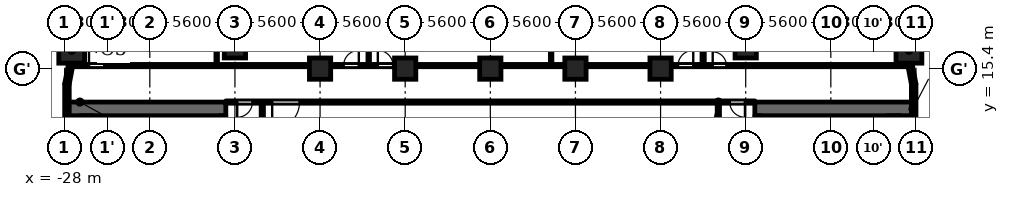
"""IFC4 building model, lengths in metres.
Left out: names, types, materials, properties, quantities, classifications, styles, units other than length and angle.
Written with IfcOpenShell. Run it as: python <this file> out.ifc"""

import sys

from ifc_helpers import new_model, si_unit, direction, frame, frame_2d, origin, origin_2d, place, context, subcontext, project, spatial, rectangle, extrude, element, fill, save


model = new_model("IFC4")
c1 = context("Model", 3, precision=1e-05, world=origin(), true_north=direction((0.0, 1.0)))
c2 = subcontext(c1, "Body", "Model", "MODEL_VIEW")
j1 = project(units=[si_unit("LENGTHUNIT", "METRE"), si_unit("PLANEANGLEUNIT", "RADIAN")], contexts=[c1])
p1 = place(None, origin())
s1 = spatial("IfcSite", under=j1, at=p1, CompositionType="ELEMENT")
p2 = place(p1, origin())
s2 = spatial("IfcBuilding", under=s1, at=p2, CompositionType="ELEMENT")
p3 = place(p2, frame((0.0, 0.0, 20.9)))
s3 = spatial("IfcBuildingStorey", under=s2, at=p3, CompositionType="ELEMENT", Elevation=20.9)
for number, where, z_axis, x_axis in (
    (1, (27.538, 16.609, 0.0), (0.0, 0.0, 1.0), (1.0, 0.0, 0.0)),
    (2, (-27.538, 16.609, 0.0), (0.0, 0.0, 1.0), (1.0, 0.0, 0.0)),
):
    element("IfcColumn", number, at=place(p3, frame(where, z_axis=z_axis, x_axis=x_axis)), inside=s3, PredefinedType="COLUMN", context=c2, shape_type="SweptSolid", body=[
        extrude(rectangle(XDim=1.7, YDim=1.7, at=origin_2d()), origin(), (0.0, 0.0, 1.0), 4.8),
    ])
for number, where, z_axis, x_axis in (
    (3, (-16.8, 16.8, 0.0), (0.0, 0.0, 1.0), (1.0, 0.0, 0.0)),
    (4, (16.8, 16.8, 0.0), (0.0, 0.0, 1.0), (1.0, 0.0, 0.0)),
    (5, (-11.2, 15.4, 0.0), (0.0, 0.0, 1.0), (1.0, 0.0, 0.0)),
    (6, (-5.6, 15.4, 0.0), (0.0, 0.0, 1.0), (1.0, 0.0, 0.0)),
    (7, (0.0, 15.4, 0.0), (0.0, 0.0, 1.0), (1.0, 0.0, 0.0)),
    (8, (5.6, 15.4, 0.0), (0.0, 0.0, 1.0), (1.0, 0.0, 0.0)),
    (9, (11.2, 15.4, 0.0), (0.0, 0.0, 1.0), (1.0, 0.0, 0.0)),
):
    element("IfcColumn", number, at=place(p3, frame(where, z_axis=z_axis, x_axis=x_axis)), inside=s3, PredefinedType="COLUMN", context=c2, shape_type="SweptSolid", body=[
        extrude(rectangle(XDim=1.4, YDim=1.4, at=origin_2d()), origin(), (0.0, 0.0, 1.0), 4.8),
    ])
p4 = place(p3, frame((27.85, 12.05, 0.0), z_axis=(0.0, 0.0, 1.0), x_axis=(0.0, 1.0, 0.0)))
e10 = element("IfcWall", 10, at=p4, inside=s3, PredefinedType="SOLIDWALL", context=c2, shape_type="SweptSolid", body=[
    extrude(rectangle(XDim=2.35, YDim=0.3, at=frame_2d((1.175, 0.0))), origin(), (0.0, 0.0, 1.0), 3.55),
])
for number, where, z_axis, x_axis in (
    (11, (27.853, 14.372, 0.0), (0.0, 0.0, 1.0), (-0.187, 0.982, 0.0)),
    (12, (-27.589, 15.753, 0.0), (0.0, 0.0, 1.0), (-0.187, -0.982, 0.0)),
):
    element("IfcWall", number, at=place(p3, frame(where, z_axis=z_axis, x_axis=x_axis)), inside=s3, PredefinedType="SOLIDWALL", context=c2, shape_type="SweptSolid", body=[
        extrude(rectangle(XDim=1.406, YDim=0.3, at=frame_2d((0.703, 0.0))), origin(), (0.0, 0.0, 1.0), 3.55),
    ])
p5 = place(p3, frame((-27.85, 14.4, 0.0), z_axis=(0.0, 0.0, 1.0), x_axis=(0.0, -1.0, 0.0)))
e13 = element("IfcWall", 13, at=p5, inside=s3, PredefinedType="SOLIDWALL", context=c2, shape_type="SweptSolid", body=[
    extrude(rectangle(XDim=2.35, YDim=0.3, at=frame_2d((1.175, 0.0))), origin(), (0.0, 0.0, 1.0), 3.55),
])
p6 = place(p3, frame((-17.4, 12.75, 0.0), z_axis=(0.0, 0.0, 1.0), x_axis=(-1.0, 0.0, 0.0)))
e14 = element("IfcWall", 14, at=p6, inside=s3, PredefinedType="SHEAR", context=c2, shape_type="SweptSolid", body=[
    extrude(rectangle(XDim=10.4, YDim=0.9, at=frame_2d((5.2, 0.0))), origin(), (0.0, 0.0, 1.0), 4.45),
])
p7 = place(p3, frame((-17.6, -12.3, 0.0), z_axis=(0.0, 0.0, 1.0), x_axis=(0.0, 1.0, 0.0)))
e15 = element("IfcWall", 15, at=p7, inside=s3, PredefinedType="SHEAR", context=c2, shape_type="SweptSolid", body=[
    extrude(rectangle(XDim=24.6, YDim=0.4, at=frame_2d((12.3, 0.0))), origin(), (0.0, 0.0, 1.0), 4.45),
])
p8 = place(p7, frame((6.0, 0.0, 0.0)))
e16 = element("IfcOpeningElement", 16, at=p8, cuts=e15, PredefinedType="OPENING", context=c2, shape_type="SweptSolid", body=[
    extrude(rectangle(XDim=1.1, YDim=2.1, at=frame_2d((0.55, 1.05))), frame((0.0, 0.21, 0.0), z_axis=(0.0, -1.0, 0.0), x_axis=(1.0, 0.0, 0.0)), (0.0, 0.0, 1.0), 0.42),
])
p9 = place(p7, frame((8.4, 0.0, 0.0)))
e17 = element("IfcOpeningElement", 17, at=p9, cuts=e15, PredefinedType="OPENING", context=c2, shape_type="SweptSolid", body=[
    extrude(rectangle(XDim=1.1, YDim=2.1, at=frame_2d((0.55, 1.05))), frame((0.0, 0.21, 0.0), z_axis=(0.0, -1.0, 0.0), x_axis=(1.0, 0.0, 0.0)), (0.0, 0.0, 1.0), 0.42),
])
p10 = place(p7, frame((10.8, 0.0, 0.0)))
e18 = element("IfcOpeningElement", 18, at=p10, cuts=e15, PredefinedType="OPENING", context=c2, shape_type="SweptSolid", body=[
    extrude(rectangle(XDim=1.1, YDim=2.1, at=frame_2d((0.55, 1.05))), frame((0.0, 0.21, 0.0), z_axis=(0.0, -1.0, 0.0), x_axis=(1.0, 0.0, 0.0)), (0.0, 0.0, 1.0), 0.42),
])
p11 = place(p7, frame((16.75, 0.0, 0.0)))
e19 = element("IfcOpeningElement", 19, at=p11, cuts=e15, PredefinedType="OPENING", context=c2, shape_type="SweptSolid", body=[
    extrude(rectangle(XDim=0.9, YDim=2.1, at=frame_2d((0.45, 1.05))), frame((0.0, 0.21, 0.0), z_axis=(0.0, -1.0, 0.0), x_axis=(1.0, 0.0, 0.0)), (0.0, 0.0, 1.0), 0.42),
])
p12 = place(p7, frame((22.8, 0.0, 0.0)))
e20 = element("IfcOpeningElement", 20, at=p12, cuts=e15, PredefinedType="OPENING", context=c2, shape_type="SweptSolid", body=[
    extrude(rectangle(XDim=1.1, YDim=2.1, at=frame_2d((0.55, 1.05))), frame((0.0, 0.21, 0.0), z_axis=(0.0, -1.0, 0.0), x_axis=(1.0, 0.0, 0.0)), (0.0, 0.0, 1.0), 0.42),
])
p13 = place(p7, frame((0.7, 0.0, 0.0)))
e21 = element("IfcOpeningElement", 21, at=p13, cuts=e15, PredefinedType="OPENING", context=c2, shape_type="SweptSolid", body=[
    extrude(rectangle(XDim=1.1, YDim=2.1, at=frame_2d((0.55, 1.05))), frame((0.0, 0.21, 0.0), z_axis=(0.0, -1.0, 0.0), x_axis=(1.0, 0.0, 0.0)), (0.0, 0.0, 1.0), 0.42),
])
p14 = place(p7, frame((12.775, 0.0, 0.0)))
e22 = element("IfcOpeningElement", 22, at=p14, cuts=e15, PredefinedType="OPENING", context=c2, shape_type="SweptSolid", body=[
    extrude(rectangle(XDim=1.8, YDim=2.1, at=frame_2d((0.9, 1.05))), frame((0.0, 0.21, 0.0), z_axis=(0.0, -1.0, 0.0), x_axis=(1.0, 0.0, 0.0)), (0.0, 0.0, 1.0), 0.42),
])
p15 = place(p3, frame((-26.55, -12.3, 0.0), z_axis=(0.0, 0.0, 1.0), x_axis=(0.0, 1.0, 0.0)))
e23 = element("IfcWall", 23, at=p15, inside=s3, PredefinedType="SHEAR", context=c2, shape_type="SweptSolid", body=[
    extrude(rectangle(XDim=24.6, YDim=0.9, at=frame_2d((12.3, 0.0))), origin(), (0.0, 0.0, 1.0), 4.45),
])
p16 = place(p3, frame((-23.55, 9.8, 0.0), z_axis=(0.0, 0.0, 1.0), x_axis=(0.0, 1.0, 0.0)))
e24 = element("IfcWall", 24, at=p16, inside=s3, PredefinedType="PARTITIONING", context=c2, shape_type="SweptSolid", body=[
    extrude(rectangle(XDim=2.5, YDim=0.2, at=frame_2d((1.25, 0.0))), origin(), (0.0, 0.0, 1.0), 4.45),
])
p17 = place(p16, frame((0.8, 0.0, 0.0)))
e25 = element("IfcOpeningElement", 25, at=p17, cuts=e24, PredefinedType="OPENING", context=c2, shape_type="SweptSolid", body=[
    extrude(rectangle(XDim=0.9, YDim=2.1, at=frame_2d((0.45, 1.05))), frame((0.0, 0.11, 0.0), z_axis=(0.0, -1.0, 0.0), x_axis=(1.0, 0.0, 0.0)), (0.0, 0.0, 1.0), 0.22),
])
p18 = place(p3, frame((17.4, 12.75, 0.0), z_axis=(0.0, 0.0, 1.0), x_axis=(1.0, 0.0, 0.0)))
e26 = element("IfcWall", 26, at=p18, inside=s3, PredefinedType="SHEAR", context=c2, shape_type="SweptSolid", body=[
    extrude(rectangle(XDim=10.4, YDim=0.9, at=frame_2d((5.2, 0.0))), origin(), (0.0, 0.0, 1.0), 4.45),
])
p19 = place(p3, frame((17.6, -12.3, 0.0), z_axis=(0.0, 0.0, 1.0), x_axis=(0.0, 1.0, 0.0)))
e27 = element("IfcWall", 27, at=p19, inside=s3, PredefinedType="SHEAR", context=c2, shape_type="SweptSolid", body=[
    extrude(rectangle(XDim=24.6, YDim=0.4, at=frame_2d((12.3, 0.0))), origin(), (0.0, 0.0, 1.0), 4.45),
])
p20 = place(p19, frame((6.0, 0.0, 0.0)))
e28 = element("IfcOpeningElement", 28, at=p20, cuts=e27, PredefinedType="OPENING", context=c2, shape_type="SweptSolid", body=[
    extrude(rectangle(XDim=1.1, YDim=2.1, at=frame_2d((0.55, 1.05))), frame((0.0, 0.21, 0.0), z_axis=(0.0, -1.0, 0.0), x_axis=(1.0, 0.0, 0.0)), (0.0, 0.0, 1.0), 0.42),
])
p21 = place(p19, frame((8.4, 0.0, 0.0)))
e29 = element("IfcOpeningElement", 29, at=p21, cuts=e27, PredefinedType="OPENING", context=c2, shape_type="SweptSolid", body=[
    extrude(rectangle(XDim=1.1, YDim=2.1, at=frame_2d((0.55, 1.05))), frame((0.0, 0.21, 0.0), z_axis=(0.0, -1.0, 0.0), x_axis=(1.0, 0.0, 0.0)), (0.0, 0.0, 1.0), 0.42),
])
p22 = place(p19, frame((10.8, 0.0, 0.0)))
e30 = element("IfcOpeningElement", 30, at=p22, cuts=e27, PredefinedType="OPENING", context=c2, shape_type="SweptSolid", body=[
    extrude(rectangle(XDim=1.1, YDim=2.1, at=frame_2d((0.55, 1.05))), frame((0.0, 0.21, 0.0), z_axis=(0.0, -1.0, 0.0), x_axis=(1.0, 0.0, 0.0)), (0.0, 0.0, 1.0), 0.42),
])
p23 = place(p19, frame((16.75, 0.0, 0.0)))
e31 = element("IfcOpeningElement", 31, at=p23, cuts=e27, PredefinedType="OPENING", context=c2, shape_type="SweptSolid", body=[
    extrude(rectangle(XDim=0.9, YDim=2.1, at=frame_2d((0.45, 1.05))), frame((0.0, 0.21, 0.0), z_axis=(0.0, -1.0, 0.0), x_axis=(1.0, 0.0, 0.0)), (0.0, 0.0, 1.0), 0.42),
])
p24 = place(p19, frame((22.8, 0.0, 0.0)))
e32 = element("IfcOpeningElement", 32, at=p24, cuts=e27, PredefinedType="OPENING", context=c2, shape_type="SweptSolid", body=[
    extrude(rectangle(XDim=1.1, YDim=2.1, at=frame_2d((0.55, 1.05))), frame((0.0, 0.21, 0.0), z_axis=(0.0, -1.0, 0.0), x_axis=(1.0, 0.0, 0.0)), (0.0, 0.0, 1.0), 0.42),
])
p25 = place(p19, frame((0.7, 0.0, 0.0)))
e33 = element("IfcOpeningElement", 33, at=p25, cuts=e27, PredefinedType="OPENING", context=c2, shape_type="SweptSolid", body=[
    extrude(rectangle(XDim=1.1, YDim=2.1, at=frame_2d((0.55, 1.05))), frame((0.0, 0.21, 0.0), z_axis=(0.0, -1.0, 0.0), x_axis=(1.0, 0.0, 0.0)), (0.0, 0.0, 1.0), 0.42),
])
p26 = place(p19, frame((12.775, 0.0, 0.0)))
e34 = element("IfcOpeningElement", 34, at=p26, cuts=e27, PredefinedType="OPENING", context=c2, shape_type="SweptSolid", body=[
    extrude(rectangle(XDim=1.8, YDim=2.1, at=frame_2d((0.9, 1.05))), frame((0.0, 0.21, 0.0), z_axis=(0.0, -1.0, 0.0), x_axis=(1.0, 0.0, 0.0)), (0.0, 0.0, 1.0), 0.42),
])
p27 = place(p3, frame((26.55, -12.3, 0.0), z_axis=(0.0, 0.0, 1.0), x_axis=(0.0, 1.0, 0.0)))
e35 = element("IfcWall", 35, at=p27, inside=s3, PredefinedType="SHEAR", context=c2, shape_type="SweptSolid", body=[
    extrude(rectangle(XDim=24.6, YDim=0.9, at=frame_2d((12.3, 0.0))), origin(), (0.0, 0.0, 1.0), 4.45),
])
p28 = place(p3, frame((23.55, 9.8, 0.0), z_axis=(0.0, 0.0, 1.0), x_axis=(0.0, 1.0, 0.0)))
e36 = element("IfcWall", 36, at=p28, inside=s3, PredefinedType="PARTITIONING", context=c2, shape_type="SweptSolid", body=[
    extrude(rectangle(XDim=2.5, YDim=0.2, at=frame_2d((1.25, 0.0))), origin(), (0.0, 0.0, 1.0), 4.45),
])
p29 = place(p28, frame((0.8, 0.0, 0.0)))
e37 = element("IfcOpeningElement", 37, at=p29, cuts=e36, PredefinedType="OPENING", context=c2, shape_type="SweptSolid", body=[
    extrude(rectangle(XDim=0.9, YDim=2.1, at=frame_2d((0.45, 1.05))), frame((0.0, 0.11, 0.0), z_axis=(0.0, -1.0, 0.0), x_axis=(1.0, 0.0, 0.0)), (0.0, 0.0, 1.0), 0.22),
])
p30 = place(p3, frame((-17.4, 13.2, 0.0), z_axis=(0.0, 0.0, 1.0), x_axis=(1.0, 0.0, 0.0)))
e38 = element("IfcWall", 38, at=p30, inside=s3, PredefinedType="PARTITIONING", context=c2, shape_type="SweptSolid", body=[
    extrude(rectangle(XDim=34.8, YDim=0.15, at=frame_2d((17.4, 0.0))), origin(), (0.0, 0.0, 1.0), 4.45),
])
p31 = place(p30, frame((3.05, 0.0, 0.0)))
e39 = element("IfcOpeningElement", 39, at=p31, cuts=e38, PredefinedType="OPENING", context=c2, shape_type="SweptSolid", body=[
    extrude(rectangle(XDim=1.8, YDim=2.1, at=frame_2d((0.9, 1.05))), frame((0.0, 0.085, 0.0), z_axis=(0.0, -1.0, 0.0), x_axis=(1.0, 0.0, 0.0)), (0.0, 0.0, 1.0), 0.17),
])
p32 = place(p30, frame((0.75, 0.0, 0.0)))
e40 = element("IfcOpeningElement", 40, at=p32, cuts=e38, PredefinedType="OPENING", context=c2, shape_type="SweptSolid", body=[
    extrude(rectangle(XDim=1.0, YDim=2.1, at=frame_2d((0.5, 1.05))), frame((0.0, 0.085, 0.0), z_axis=(0.0, -1.0, 0.0), x_axis=(1.0, 0.0, 0.0)), (0.0, 0.0, 1.0), 0.17),
])
p33 = place(p30, frame((33.15, 0.0, 0.0)))
e41 = element("IfcOpeningElement", 41, at=p33, cuts=e38, PredefinedType="OPENING", context=c2, shape_type="SweptSolid", body=[
    extrude(rectangle(XDim=1.0, YDim=2.1, at=frame_2d((0.5, 1.05))), frame((0.0, 0.085, 0.0), z_axis=(0.0, -1.0, 0.0), x_axis=(1.0, 0.0, 0.0)), (0.0, 0.0, 1.0), 0.17),
])
p34 = place(p3, frame((-27.446, 15.6, 0.0), z_axis=(0.0, 0.0, 1.0), x_axis=(1.0, 0.0, 0.0)))
e42 = element("IfcWall", 42, at=p34, inside=s3, PredefinedType="PARTITIONING", context=c2, shape_type="SweptSolid", body=[
    extrude(rectangle(XDim=54.892, YDim=0.15, at=frame_2d((27.446, 0.0))), origin(), (0.0, 0.0, 1.0), 4.45),
])
p35 = place(p34, frame((1.046, 0.0, 0.0)))
e43 = element("IfcOpeningElement", 43, at=p35, cuts=e42, PredefinedType="OPENING", context=c2, shape_type="SweptSolid", body=[
    extrude(rectangle(XDim=1.0, YDim=2.1, at=frame_2d((0.5, 1.05))), frame((0.0, 0.085, 0.0), z_axis=(0.0, -1.0, 0.0), x_axis=(1.0, 0.0, 0.0)), (0.0, 0.0, 1.0), 0.17),
])
p36 = place(p34, frame((17.796, 0.0, 0.0)))
e44 = element("IfcOpeningElement", 44, at=p36, cuts=e42, PredefinedType="OPENING", context=c2, shape_type="SweptSolid", body=[
    extrude(rectangle(XDim=1.0, YDim=2.1, at=frame_2d((0.5, 1.05))), frame((0.0, 0.085, 0.0), z_axis=(0.0, -1.0, 0.0), x_axis=(1.0, 0.0, 0.0)), (0.0, 0.0, 1.0), 0.17),
])
p37 = place(p34, frame((20.046, 0.0, 0.0)))
e45 = element("IfcOpeningElement", 45, at=p37, cuts=e42, PredefinedType="OPENING", context=c2, shape_type="SweptSolid", body=[
    extrude(rectangle(XDim=1.0, YDim=2.1, at=frame_2d((0.5, 1.05))), frame((0.0, 0.085, 0.0), z_axis=(0.0, -1.0, 0.0), x_axis=(1.0, 0.0, 0.0)), (0.0, 0.0, 1.0), 0.17),
])
p38 = place(p34, frame((39.796, 0.0, 0.0)))
e46 = element("IfcOpeningElement", 46, at=p38, cuts=e42, PredefinedType="OPENING", context=c2, shape_type="SweptSolid", body=[
    extrude(rectangle(XDim=1.0, YDim=2.1, at=frame_2d((0.5, 1.05))), frame((0.0, 0.085, 0.0), z_axis=(0.0, -1.0, 0.0), x_axis=(1.0, 0.0, 0.0)), (0.0, 0.0, 1.0), 0.17),
])
p39 = place(p34, frame((42.075, 0.0, 0.0)))
e47 = element("IfcOpeningElement", 47, at=p39, cuts=e42, PredefinedType="OPENING", context=c2, shape_type="SweptSolid", body=[
    extrude(rectangle(XDim=0.9, YDim=2.1, at=frame_2d((0.45, 1.05))), frame((0.0, 0.085, 0.0), z_axis=(0.0, -1.0, 0.0), x_axis=(1.0, 0.0, 0.0)), (0.0, 0.0, 1.0), 0.17),
])
p40 = place(p3, frame((-18.0, 15.675, 0.0), z_axis=(0.0, 0.0, 1.0), x_axis=(0.0, 1.0, 0.0)))
e48 = element("IfcWall", 48, at=p40, inside=s3, PredefinedType="PARTITIONING", context=c2, shape_type="SweptSolid", body=[
    extrude(rectangle(XDim=6.405, YDim=0.1, at=frame_2d((3.203, 0.0))), origin(), (0.0, 0.0, 1.0), 4.45),
])
p41 = place(p3, frame((-15.0, 6.769, 0.0), z_axis=(0.0, 0.0, 1.0), x_axis=(0.0, 1.0, 0.0)))
e49 = element("IfcWall", 49, at=p41, inside=s3, PredefinedType="PARTITIONING", context=c2, shape_type="SweptSolid", body=[
    extrude(rectangle(XDim=6.356, YDim=0.15, at=frame_2d((3.178, 0.0))), origin(), (0.0, 0.0, 1.0), 4.45),
])
for number, where, z_axis, x_axis in (
    (50, (-8.0, 15.675, 0.0), (0.0, 0.0, 1.0), (0.0, 1.0, 0.0)),
    (51, (4.0, 15.675, 0.0), (0.0, 0.0, 1.0), (0.0, 1.0, 0.0)),
):
    element("IfcWall", number, at=place(p3, frame(where, z_axis=z_axis, x_axis=x_axis)), inside=s3, PredefinedType="PARTITIONING", context=c2, shape_type="SweptSolid", body=[
        extrude(rectangle(XDim=6.405, YDim=0.1, at=frame_2d((3.203, 0.0))), origin(), (0.0, 0.0, 1.0), 4.45),
    ])
p42 = place(p3, frame((14.0, 15.675, 0.0), z_axis=(0.0, 0.0, 1.0), x_axis=(0.0, 1.0, 0.0)))
e52 = element("IfcWall", 52, at=p42, inside=s3, PredefinedType="PARTITIONING", context=c2, shape_type="SweptSolid", body=[
    extrude(rectangle(XDim=6.405, YDim=0.15, at=frame_2d((3.203, 0.0))), origin(), (0.0, 0.0, 1.0), 4.45),
])
p43 = place(p3, frame((15.0, 6.769, 0.0), z_axis=(0.0, 0.0, 1.0), x_axis=(0.0, 1.0, 0.0)))
e53 = element("IfcWall", 53, at=p43, inside=s3, PredefinedType="PARTITIONING", context=c2, shape_type="SweptSolid", body=[
    extrude(rectangle(XDim=6.356, YDim=0.15, at=frame_2d((3.178, 0.0))), origin(), (0.0, 0.0, 1.0), 4.45),
])
p44 = place(p31, origin())
e54 = element("IfcDoor", 54, at=p44, inside=s3, OperationType="SINGLE_SWING_LEFT", PredefinedType="DOOR", context=c2, shape_type="SweptSolid", body=[
    extrude(rectangle(XDim=1.8, YDim=2.1, at=frame_2d((0.9, 1.05))), frame((0.0, 0.025, 0.0), z_axis=(0.0, -1.0, 0.0), x_axis=(1.0, 0.0, 0.0)), (0.0, 0.0, 1.0), 0.05),
])
fill(e39, e54)
p45 = place(p32, origin())
e55 = element("IfcDoor", 55, at=p45, inside=s3, OperationType="SINGLE_SWING_LEFT", PredefinedType="DOOR", context=c2, shape_type="SweptSolid", body=[
    extrude(rectangle(XDim=1.0, YDim=2.1, at=frame_2d((0.5, 1.05))), frame((0.0, 0.025, 0.0), z_axis=(0.0, -1.0, 0.0), x_axis=(1.0, 0.0, 0.0)), (0.0, 0.0, 1.0), 0.05),
])
fill(e40, e55)
p46 = place(p33, origin())
e56 = element("IfcDoor", 56, at=p46, inside=s3, OperationType="SINGLE_SWING_RIGHT", PredefinedType="DOOR", context=c2, shape_type="SweptSolid", body=[
    extrude(rectangle(XDim=1.0, YDim=2.1, at=frame_2d((0.5, 1.05))), frame((0.0, 0.025, 0.0), z_axis=(0.0, -1.0, 0.0), x_axis=(1.0, 0.0, 0.0)), (0.0, 0.0, 1.0), 0.05),
])
fill(e41, e56)
p47 = place(p35, origin())
e57 = element("IfcDoor", 57, at=p47, inside=s3, OperationType="SINGLE_SWING_RIGHT", PredefinedType="DOOR", context=c2, shape_type="SweptSolid", body=[
    extrude(rectangle(XDim=1.0, YDim=2.1, at=frame_2d((0.5, 1.05))), frame((0.0, 0.025, 0.0), z_axis=(0.0, -1.0, 0.0), x_axis=(1.0, 0.0, 0.0)), (0.0, 0.0, 1.0), 0.05),
])
fill(e43, e57)
p48 = place(p36, origin())
e58 = element("IfcDoor", 58, at=p48, inside=s3, OperationType="SINGLE_SWING_LEFT", PredefinedType="DOOR", context=c2, shape_type="SweptSolid", body=[
    extrude(rectangle(XDim=1.0, YDim=2.1, at=frame_2d((0.5, 1.05))), frame((0.0, 0.025, 0.0), z_axis=(0.0, -1.0, 0.0), x_axis=(1.0, 0.0, 0.0)), (0.0, 0.0, 1.0), 0.05),
])
fill(e44, e58)
p49 = place(p37, origin())
e59 = element("IfcDoor", 59, at=p49, inside=s3, OperationType="SINGLE_SWING_RIGHT", PredefinedType="DOOR", context=c2, shape_type="SweptSolid", body=[
    extrude(rectangle(XDim=1.0, YDim=2.1, at=frame_2d((0.5, 1.05))), frame((0.0, 0.025, 0.0), z_axis=(0.0, -1.0, 0.0), x_axis=(1.0, 0.0, 0.0)), (0.0, 0.0, 1.0), 0.05),
])
fill(e45, e59)
p50 = place(p38, origin())
e60 = element("IfcDoor", 60, at=p50, inside=s3, OperationType="SINGLE_SWING_LEFT", PredefinedType="DOOR", context=c2, shape_type="SweptSolid", body=[
    extrude(rectangle(XDim=1.0, YDim=2.1, at=frame_2d((0.5, 1.05))), frame((0.0, 0.025, 0.0), z_axis=(0.0, -1.0, 0.0), x_axis=(1.0, 0.0, 0.0)), (0.0, 0.0, 1.0), 0.05),
])
fill(e46, e60)
p51 = place(p39, origin())
e61 = element("IfcDoor", 61, at=p51, inside=s3, OperationType="SINGLE_SWING_RIGHT", PredefinedType="DOOR", context=c2, shape_type="SweptSolid", body=[
    extrude(rectangle(XDim=0.9, YDim=2.1, at=frame_2d((0.45, 1.05))), frame((0.0, 0.025, 0.0), z_axis=(0.0, -1.0, 0.0), x_axis=(1.0, 0.0, 0.0)), (0.0, 0.0, 1.0), 0.05),
])
fill(e47, e61)
save(model, sys.argv[1])
